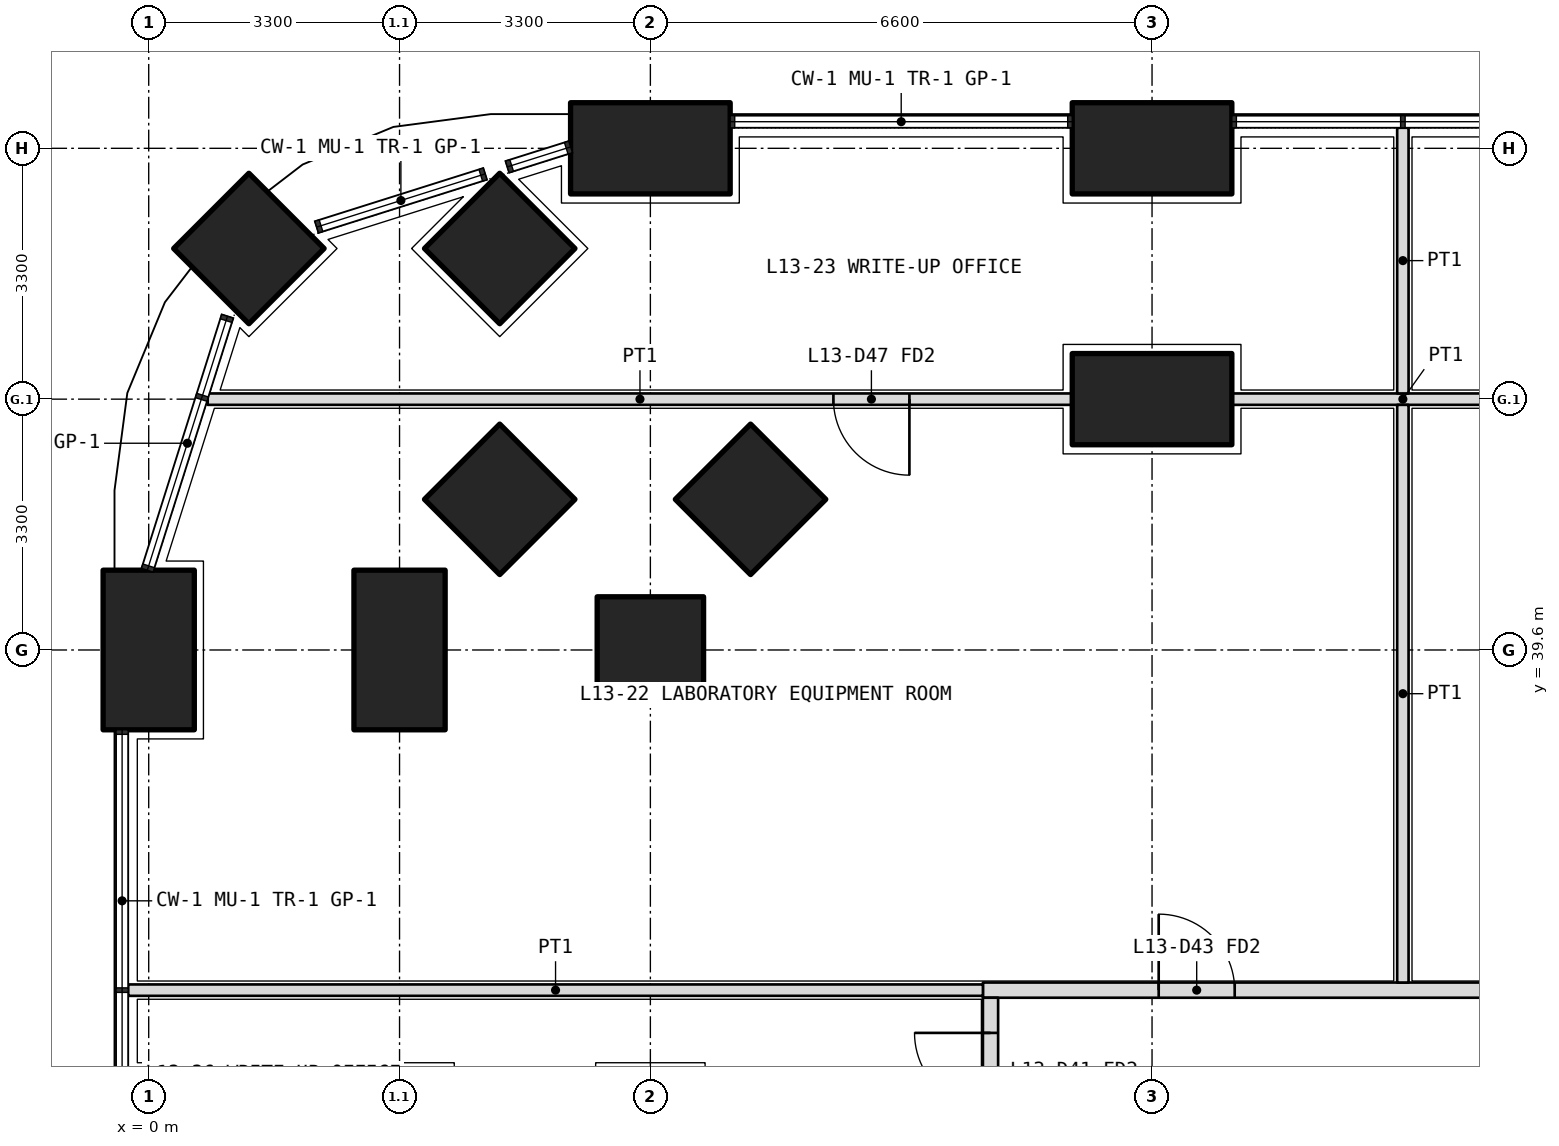
"""IFC4 building model, lengths in metres.
Left out: names, types, materials, properties, quantities, classifications, styles, units other than length and angle.
Written with IfcOpenShell. Run it as: python <this file> out.ifc"""

import sys

from ifc_helpers import new_model, si_unit, direction, frame, frame_2d, origin, origin_2d, place, context, subcontext, project, spatial, rectangle, extrude, element, fill, save


model = new_model("IFC4")
c1 = context("Model", 3, precision=1e-05, world=origin(), true_north=direction((0.0, 1.0)))
c2 = subcontext(c1, "Body", "Model", "MODEL_VIEW")
j1 = project(units=[si_unit("LENGTHUNIT", "METRE"), si_unit("PLANEANGLEUNIT", "RADIAN")], contexts=[c1])
p1 = place(None, origin())
s1 = spatial("IfcSite", under=j1, at=p1, CompositionType="ELEMENT")
p2 = place(p1, origin())
s2 = spatial("IfcBuilding", under=s1, at=p2, CompositionType="ELEMENT")
p3 = place(p2, frame((0.0, 0.0, 59.1)))
s3 = spatial("IfcBuildingStorey", under=s2, at=p3, CompositionType="ELEMENT", Elevation=59.1)
p4 = place(p3, frame((1.318, 44.882, 0.0), z_axis=(0.0, 0.0, 1.0), x_axis=(0.707106781187, 0.707106781187, 0.0)))
e1 = element("IfcColumn", 1, at=p4, inside=s3, PredefinedType="COLUMN", context=c2, shape_type="SweptSolid", body=[
    extrude(rectangle(XDim=1.4, YDim=1.4, at=origin_2d()), origin(), (0.0, 0.0, 1.0), 4.2),
])
for number, where, z_axis, x_axis in (
    (2, (0.0, 39.6, 0.0), (0.0, 0.0, 1.0), (0.0, 1.0, 0.0)),
    (3, (6.6, 46.2, 0.0), (0.0, 0.0, 1.0), (1.0, 0.0, 0.0)),
    (4, (13.2, 46.2, 0.0), (0.0, 0.0, 1.0), (1.0, 0.0, 0.0)),
):
    element("IfcColumn", number, at=place(p3, frame(where, z_axis=z_axis, x_axis=x_axis)), inside=s3, PredefinedType="COLUMN", context=c2, shape_type="SweptSolid", body=[
        extrude(rectangle(XDim=2.1, YDim=1.2, at=origin_2d()), origin(), (0.0, 0.0, 1.0), 4.2),
    ])
for number, where, z_axis, x_axis in (
    (5, (6.6, 39.6, 0.0), (0.0, 0.0, 1.0), (1.0, 0.0, 0.0)),
    (6, (4.618, 44.882, 0.0), (0.0, 0.0, 1.0), (0.707, 0.707, 0.0)),
):
    element("IfcColumn", number, at=place(p3, frame(where, z_axis=z_axis, x_axis=x_axis)), inside=s3, PredefinedType="COLUMN", context=c2, shape_type="SweptSolid", body=[
        extrude(rectangle(XDim=1.4, YDim=1.4, at=origin_2d()), origin(), (0.0, 0.0, 1.0), 4.2),
    ])
p5 = place(p3, frame((3.3, 39.6, 0.0), z_axis=(0.0, 0.0, 1.0), x_axis=(0.0, 1.0, 0.0)))
e7 = element("IfcColumn", 7, at=p5, inside=s3, PredefinedType="COLUMN", context=c2, shape_type="SweptSolid", body=[
    extrude(rectangle(XDim=2.1, YDim=1.2, at=origin_2d()), origin(), (0.0, 0.0, 1.0), 4.2),
])
p6 = place(p3, frame((4.618, 41.582, 0.0), z_axis=(0.0, 0.0, 1.0), x_axis=(0.707106781187, 0.707106781187, 0.0)))
e8 = element("IfcColumn", 8, at=p6, inside=s3, PredefinedType="COLUMN", context=c2, shape_type="SweptSolid", body=[
    extrude(rectangle(XDim=1.4, YDim=1.4, at=origin_2d()), origin(), (0.0, 0.0, 1.0), 4.2),
])
p7 = place(p3, frame((13.2, 42.9, 0.0), z_axis=(0.0, 0.0, 1.0), x_axis=(1.0, 0.0, 0.0)))
e9 = element("IfcColumn", 9, at=p7, inside=s3, PredefinedType="COLUMN", context=c2, shape_type="SweptSolid", body=[
    extrude(rectangle(XDim=2.1, YDim=1.2, at=origin_2d()), origin(), (0.0, 0.0, 1.0), 4.2),
])
p8 = place(p3, frame((7.918, 41.582, 0.0), z_axis=(0.0, 0.0, 1.0), x_axis=(0.707106781187, 0.707106781187, 0.0)))
e10 = element("IfcColumn", 10, at=p8, inside=s3, PredefinedType="COLUMN", context=c2, shape_type="SweptSolid", body=[
    extrude(rectangle(XDim=1.4, YDim=1.4, at=origin_2d()), origin(), (0.0, 0.0, 1.0), 4.2),
])
p9 = place(p3, frame((10.975, 35.125, 0.0), z_axis=(0.0, 0.0, 1.0), x_axis=(1.0, 0.0, 0.0)))
e11 = element("IfcWall", 11, at=p9, inside=s3, PredefinedType="PARTITIONING", context=c2, shape_type="SweptSolid", body=[
    extrude(rectangle(XDim=30.85, YDim=0.2, at=frame_2d((15.425, 0.0))), origin(), (0.0, 0.0, 1.0), 2.85),
])
p10 = place(p9, frame((2.312, 0.0, 0.0)))
e12 = element("IfcOpeningElement", 12, at=p10, cuts=e11, PredefinedType="OPENING", context=c2, shape_type="SweptSolid", body=[
    extrude(rectangle(XDim=1.0, YDim=2.1, at=frame_2d((0.5, 1.05))), frame((0.0, 0.11, 0.0), z_axis=(0.0, -1.0, 0.0), x_axis=(1.0, 0.0, 0.0)), (0.0, 0.0, 1.0), 0.22),
])
p11 = place(p9, frame((13.175, 0.0, 0.0)))
e13 = element("IfcOpeningElement", 13, at=p11, cuts=e11, PredefinedType="OPENING", context=c2, shape_type="SweptSolid", body=[
    extrude(rectangle(XDim=1.2, YDim=2.1, at=frame_2d((0.6, 1.05))), frame((0.0, 0.11, 0.0), z_axis=(0.0, -1.0, 0.0), x_axis=(1.0, 0.0, 0.0)), (0.0, 0.0, 1.0), 0.22),
])
p12 = place(p9, frame((25.788, 0.0, 0.0)))
e14 = element("IfcOpeningElement", 14, at=p12, cuts=e11, PredefinedType="OPENING", context=c2, shape_type="SweptSolid", body=[
    extrude(rectangle(XDim=1.2, YDim=2.1, at=frame_2d((0.6, 1.05))), frame((0.0, 0.11, 0.0), z_axis=(0.0, -1.0, 0.0), x_axis=(1.0, 0.0, 0.0)), (0.0, 0.0, 1.0), 0.22),
])
p13 = place(p3, frame((11.075, 11.175, 0.0), z_axis=(0.0, 0.0, 1.0), x_axis=(0.0, 1.0, 0.0)))
e15 = element("IfcWall", 15, at=p13, inside=s3, PredefinedType="PARTITIONING", context=c2, shape_type="SweptSolid", body=[
    extrude(rectangle(XDim=23.85, YDim=0.2, at=frame_2d((11.925, 0.0))), origin(), (0.0, 0.0, 1.0), 2.85),
])
p14 = place(p13, frame((0.363, 0.0, 0.0)))
e16 = element("IfcOpeningElement", 16, at=p14, cuts=e15, PredefinedType="OPENING", context=c2, shape_type="SweptSolid", body=[
    extrude(rectangle(XDim=1.2, YDim=2.1, at=frame_2d((0.6, 1.05))), frame((0.0, 0.11, 0.0), z_axis=(0.0, -1.0, 0.0), x_axis=(1.0, 0.0, 0.0)), (0.0, 0.0, 1.0), 0.22),
])
p15 = place(p13, frame((2.575, 0.0, 0.0)))
e17 = element("IfcOpeningElement", 17, at=p15, cuts=e15, PredefinedType="OPENING", context=c2, shape_type="SweptSolid", body=[
    extrude(rectangle(XDim=1.0, YDim=2.1, at=frame_2d((0.5, 1.05))), frame((0.0, 0.11, 0.0), z_axis=(0.0, -1.0, 0.0), x_axis=(1.0, 0.0, 0.0)), (0.0, 0.0, 1.0), 0.22),
])
p16 = place(p13, frame((5.65, 0.0, 0.0)))
e18 = element("IfcOpeningElement", 18, at=p16, cuts=e15, PredefinedType="OPENING", context=c2, shape_type="SweptSolid", body=[
    extrude(rectangle(XDim=0.9, YDim=2.1, at=frame_2d((0.45, 1.05))), frame((0.0, 0.11, 0.0), z_axis=(0.0, -1.0, 0.0), x_axis=(1.0, 0.0, 0.0)), (0.0, 0.0, 1.0), 0.22),
])
p17 = place(p13, frame((9.5, 0.0, 0.0)))
e19 = element("IfcOpeningElement", 19, at=p17, cuts=e15, PredefinedType="OPENING", context=c2, shape_type="SweptSolid", body=[
    extrude(rectangle(XDim=0.9, YDim=2.1, at=frame_2d((0.45, 1.05))), frame((0.0, 0.11, 0.0), z_axis=(0.0, -1.0, 0.0), x_axis=(1.0, 0.0, 0.0)), (0.0, 0.0, 1.0), 0.22),
])
p18 = place(p13, frame((13.025, 0.0, 0.0)))
e20 = element("IfcOpeningElement", 20, at=p18, cuts=e15, PredefinedType="OPENING", context=c2, shape_type="SweptSolid", body=[
    extrude(rectangle(XDim=1.0, YDim=2.1, at=frame_2d((0.5, 1.05))), frame((0.0, 0.11, 0.0), z_axis=(0.0, -1.0, 0.0), x_axis=(1.0, 0.0, 0.0)), (0.0, 0.0, 1.0), 0.22),
])
p19 = place(p13, frame((18.025, 0.0, 0.0)))
e21 = element("IfcOpeningElement", 21, at=p19, cuts=e15, PredefinedType="OPENING", context=c2, shape_type="SweptSolid", body=[
    extrude(rectangle(XDim=1.0, YDim=2.1, at=frame_2d((0.5, 1.05))), frame((0.0, 0.11, 0.0), z_axis=(0.0, -1.0, 0.0), x_axis=(1.0, 0.0, 0.0)), (0.0, 0.0, 1.0), 0.22),
])
p20 = place(p13, frame((22.387, 0.0, 0.0)))
e22 = element("IfcOpeningElement", 22, at=p20, cuts=e15, PredefinedType="OPENING", context=c2, shape_type="SweptSolid", body=[
    extrude(rectangle(XDim=1.0, YDim=2.1, at=frame_2d((0.5, 1.05))), frame((0.0, 0.11, 0.0), z_axis=(0.0, -1.0, 0.0), x_axis=(1.0, 0.0, 0.0)), (0.0, 0.0, 1.0), 0.22),
])
p21 = place(p3, frame((-0.27, 35.125, 0.0), z_axis=(0.0, 0.0, 1.0), x_axis=(1.0, 0.0, 0.0)))
e23 = element("IfcWall", 23, at=p21, inside=s3, PredefinedType="PARTITIONING", context=c2, shape_type="SweptSolid", body=[
    extrude(rectangle(XDim=11.245, YDim=0.15, at=frame_2d((5.623, 0.0))), origin(), (0.0, 0.0, 1.0), 2.7),
])
p22 = place(p3, frame((18.75, 42.9, 0.0), z_axis=(0.0, 0.0, 1.0), x_axis=(-1.0, 0.0, 0.0)))
e24 = element("IfcWall", 24, at=p22, inside=s3, PredefinedType="PARTITIONING", context=c2, shape_type="SweptSolid", body=[
    extrude(rectangle(XDim=4.5, YDim=0.15, at=frame_2d((2.25, 0.0))), origin(), (0.0, 0.0, 1.0), 3.9),
])
p23 = place(p3, frame((12.15, 42.9, 0.0), z_axis=(0.0, 0.0, 1.0), x_axis=(-1.0, 0.0, 0.0)))
e25 = element("IfcWall", 25, at=p23, inside=s3, PredefinedType="PARTITIONING", context=c2, shape_type="SweptSolid", body=[
    extrude(rectangle(XDim=11.374, YDim=0.15, at=frame_2d((5.687, 0.0))), origin(), (0.0, 0.0, 1.0), 2.7),
])
p24 = place(p23, frame((2.142, 0.0, 0.0)))
e26 = element("IfcOpeningElement", 26, at=p24, cuts=e25, PredefinedType="OPENING", context=c2, shape_type="SweptSolid", body=[
    extrude(rectangle(XDim=1.0, YDim=2.1, at=frame_2d((0.5, 1.05))), frame((0.0, 0.085, 0.0), z_axis=(0.0, -1.0, 0.0), x_axis=(1.0, 0.0, 0.0)), (0.0, 0.0, 1.0), 0.17),
])
p25 = place(p3, frame((16.5, 46.47, 0.0), z_axis=(0.0, 0.0, 1.0), x_axis=(0.0, -1.0, 0.0)))
e27 = element("IfcWall", 27, at=p25, inside=s3, PredefinedType="PARTITIONING", context=c2, shape_type="SweptSolid", body=[
    extrude(rectangle(XDim=3.495, YDim=0.15, at=frame_2d((1.748, 0.0))), origin(), (0.0, 0.0, 1.0), 2.7),
])
p26 = place(p3, frame((16.5, 42.825, 0.0), z_axis=(0.0, 0.0, 1.0), x_axis=(0.0, -1.0, 0.0)))
e28 = element("IfcWall", 28, at=p26, inside=s3, PredefinedType="PARTITIONING", context=c2, shape_type="SweptSolid", body=[
    extrude(rectangle(XDim=7.6, YDim=0.15, at=frame_2d((3.8, 0.0))), origin(), (0.0, 0.0, 1.0), 3.9),
])
p27 = place(p10, origin())
e29 = element("IfcDoor", 29, at=p27, inside=s3, OperationType="SINGLE_SWING_LEFT", PredefinedType="DOOR", context=c2, shape_type="SweptSolid", body=[
    extrude(rectangle(XDim=1.0, YDim=2.1, at=frame_2d((0.5, 1.05))), frame((0.0, 0.025, 0.0), z_axis=(0.0, -1.0, 0.0), x_axis=(1.0, 0.0, 0.0)), (0.0, 0.0, 1.0), 0.05),
])
fill(e12, e29)
p28 = place(p24, origin())
e30 = element("IfcDoor", 30, at=p28, inside=s3, OperationType="SINGLE_SWING_LEFT", PredefinedType="DOOR", context=c2, shape_type="SweptSolid", body=[
    extrude(rectangle(XDim=1.0, YDim=2.1, at=frame_2d((0.5, 1.05))), frame((0.0, 0.025, 0.0), z_axis=(0.0, -1.0, 0.0), x_axis=(1.0, 0.0, 0.0)), (0.0, 0.0, 1.0), 0.05),
])
fill(e26, e30)
p29 = place(p20, origin())
e31 = element("IfcDoor", 31, at=p29, inside=s3, OperationType="SINGLE_SWING_RIGHT", PredefinedType="DOOR", context=c2, shape_type="SweptSolid", body=[
    extrude(rectangle(XDim=1.0, YDim=2.1, at=frame_2d((0.5, 1.05))), frame((0.0, 0.025, 0.0), z_axis=(0.0, -1.0, 0.0), x_axis=(1.0, 0.0, 0.0)), (0.0, 0.0, 1.0), 0.05),
])
fill(e22, e31)
save(model, sys.argv[1])
